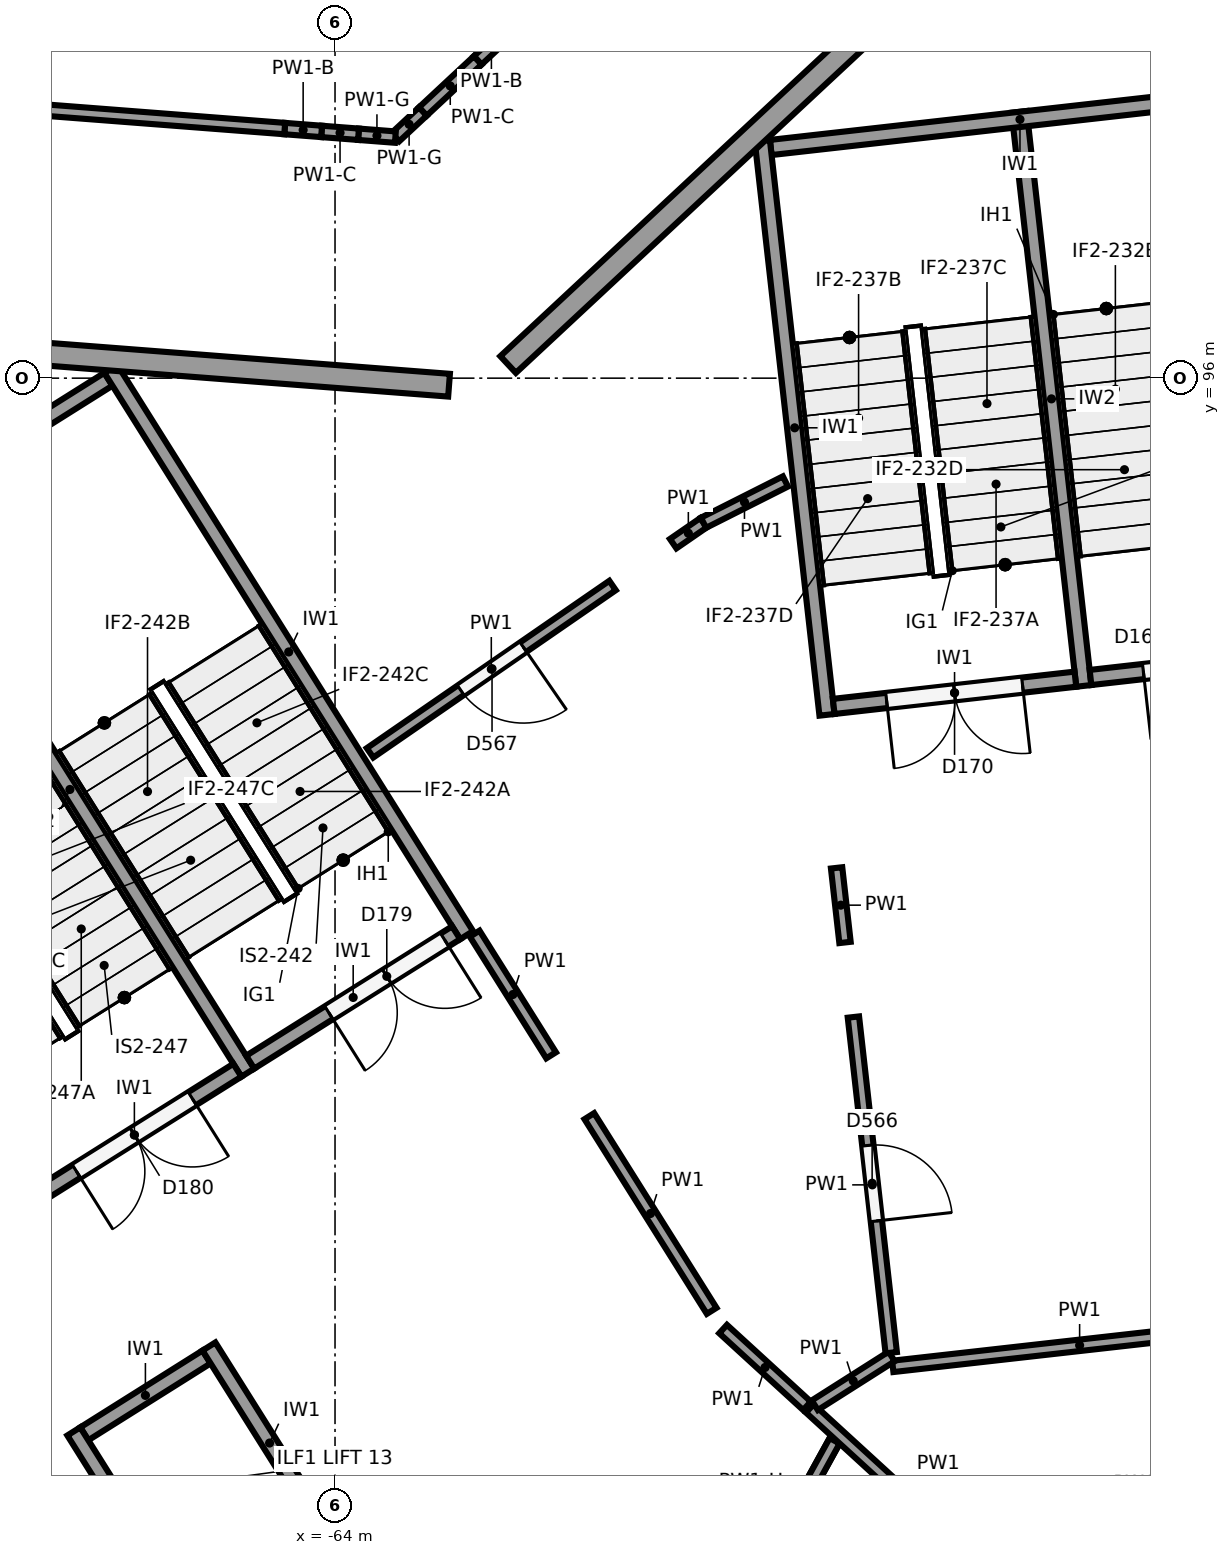
"""IFC4 building model, lengths in metres.
Left out: names, types, materials, properties, quantities, classifications, styles, units other than length and angle.
Written with IfcOpenShell. Run it as: python <this file> out.ifc"""

import sys

from ifc_helpers import new_model, si_unit, direction, frame, frame_2d, origin, origin_2d, place, context, subcontext, project, spatial, rectangle, circle, extrude, element, fill, save


model = new_model("IFC4")
c1 = context("Model", 3, precision=1e-05, world=origin(), true_north=direction((0.0, 1.0)))
c2 = subcontext(c1, "Body", "Model", "MODEL_VIEW")
j1 = project(units=[si_unit("LENGTHUNIT", "METRE"), si_unit("PLANEANGLEUNIT", "RADIAN")], contexts=[c1])
p1 = place(None, origin())
s1 = spatial("IfcSite", under=j1, at=p1, CompositionType="ELEMENT")
p2 = place(p1, origin())
s2 = spatial("IfcBuilding", under=s1, at=p2, CompositionType="ELEMENT")
p3 = place(p2, origin())
s3 = spatial("IfcBuildingStorey", under=s2, at=p3, CompositionType="ELEMENT", Elevation=0.0)
for number, where, z_axis, x_axis in (
    (1, (-55.8, 88.542, 0.0), (0.0, 0.0, 1.0), (1.0, 0.0, 0.0)),
    (2, (-62.052, 95.873, 0.0), (0.0, 0.0, 1.0), (1.0, 0.0, 0.0)),
):
    element("IfcColumn", number, at=place(p3, frame(where, z_axis=z_axis, x_axis=x_axis)), inside=s3, PredefinedType="COLUMN", context=c2, shape_type="SweptSolid", body=[
        extrude(circle(Radius=0.45, at=origin_2d()), origin(), (0.0, 0.0, 1.0), 6.5),
    ])
p4 = place(p3, frame((-63.731, 85.771, 0.0), z_axis=(0.0, 0.0, 1.0), x_axis=(1.0, 0.0, 0.0)))
e3 = element("IfcColumn", 3, at=p4, inside=s3, PredefinedType="COLUMN", context=c2, shape_type="SweptSolid", body=[
    extrude(circle(Radius=0.6, at=origin_2d()), origin(), (0.0, 0.0, 1.0), 6.5),
])
p5 = place(p3, frame((-63.373, 99.648, -0.3), z_axis=(0.0, 0.0, 1.0), x_axis=(1.0, 0.0, 0.0)))
e4 = element("IfcColumn", 4, at=p5, inside=s3, PredefinedType="COLUMN", context=c2, shape_type="SweptSolid", body=[
    extrude(circle(Radius=0.4, at=origin_2d()), origin(), (0.0, 0.0, 1.0), 6.8),
])
p6 = place(p3, frame((-61.723, 96.179, 0.0), z_axis=(0.0, 0.0, 1.0), x_axis=(0.731540985517, 0.681797467368, 0.0)))
e5 = element("IfcWall", 5, at=p6, inside=s3, PredefinedType="SOLIDWALL", context=c2, shape_type="SweptSolid", body=[
    extrude(rectangle(XDim=12.314, YDim=0.3, at=frame_2d((6.157, 0.0))), origin(), (0.0, 0.0, 1.0), 4.85),
])
p7 = place(p3, frame((-74.977, 96.87, 0.0), z_axis=(0.0, 0.0, 1.0), x_axis=(0.997035289114, -0.076945644854, 0.0)))
e6 = element("IfcWall", 6, at=p7, inside=s3, PredefinedType="SOLIDWALL", context=c2, shape_type="SweptSolid", body=[
    extrude(rectangle(XDim=12.514, YDim=0.3, at=frame_2d((6.257, 0.0))), origin(), (0.0, 0.0, 1.0), 4.85),
])
p8 = place(p3, frame((-58.378, 99.123, 0.0), z_axis=(0.0, 0.0, 1.0), x_axis=(0.111982724367, -0.993710153638, 0.0)))
e7 = element("IfcWall", 7, at=p8, inside=s3, PredefinedType="SHEAR", context=c2, shape_type="SweptSolid", body=[
    extrude(rectangle(XDim=7.6, YDim=0.2, at=frame_2d((3.8, 0.0))), origin(), (0.0, 0.0, 1.0), 6.15),
])
p9 = place(p3, frame((-51.709, 99.774, 0.0), z_axis=(0.0, 0.0, 1.0), x_axis=(-0.993715690617, -0.111933579504, 0.0)))
e8 = element("IfcWall", 8, at=p9, inside=s3, PredefinedType="SHEAR", context=c2, shape_type="SweptSolid", body=[
    extrude(rectangle(XDim=6.6, YDim=0.2, at=frame_2d((3.3, 0.0))), origin(), (0.0, 0.0, 1.0), 6.15),
])
p10 = place(p3, frame((-54.999, 99.504, 0.0), z_axis=(0.0, 0.0, 1.0), x_axis=(0.111982724367, -0.993710153638, 0.0)))
e9 = element("IfcWall", 9, at=p10, inside=s3, PredefinedType="SHEAR", context=c2, shape_type="SweptSolid", body=[
    extrude(rectangle(XDim=7.6, YDim=0.2, at=frame_2d((3.8, 0.0))), origin(), (0.0, 0.0, 1.0), 6.15),
])
p11 = place(p3, frame((-50.88, 92.42, 0.0), z_axis=(0.0, 0.0, 1.0), x_axis=(-0.993707560215, -0.112005735442, 0.0)))
e10 = element("IfcWall", 10, at=p11, inside=s3, PredefinedType="SHEAR", context=c2, shape_type="SweptSolid", body=[
    extrude(rectangle(XDim=3.2, YDim=0.2, at=frame_2d((1.6, 0.0))), origin(), (0.0, 0.0, 1.0), 6.15),
])
p12 = place(p11, frame((0.7, 0.0, 0.0)))
e11 = element("IfcOpeningElement", 11, at=p12, cuts=e10, PredefinedType="OPENING", context=c2, shape_type="SweptSolid", body=[
    extrude(rectangle(XDim=1.8, YDim=2.1, at=frame_2d((0.9, 1.05))), frame((0.0, 0.11, 0.0), z_axis=(0.0, -1.0, 0.0), x_axis=(1.0, 0.0, 0.0)), (0.0, 0.0, 1.0), 0.22),
])
p13 = place(p3, frame((-54.259, 92.04, 0.0), z_axis=(0.0, 0.0, 1.0), x_axis=(-0.993717005286, -0.11192190762, 0.0)))
e12 = element("IfcWall", 12, at=p13, inside=s3, PredefinedType="SHEAR", context=c2, shape_type="SweptSolid", body=[
    extrude(rectangle(XDim=3.2, YDim=0.2, at=frame_2d((1.6, 0.0))), origin(), (0.0, 0.0, 1.0), 6.15),
])
p14 = place(p13, frame((0.7, 0.0, 0.0)))
e13 = element("IfcOpeningElement", 13, at=p14, cuts=e12, PredefinedType="OPENING", context=c2, shape_type="SweptSolid", body=[
    extrude(rectangle(XDim=1.8, YDim=2.1, at=frame_2d((0.9, 1.05))), frame((0.0, 0.11, 0.0), z_axis=(0.0, -1.0, 0.0), x_axis=(1.0, 0.0, 0.0)), (0.0, 0.0, 1.0), 0.22),
])
p15 = place(p3, frame((-66.95, 96.123, 0.0), z_axis=(0.0, 0.0, 1.0), x_axis=(0.532032334759, -0.846724036963, 0.0)))
e14 = element("IfcWall", 14, at=p15, inside=s3, PredefinedType="SHEAR", context=c2, shape_type="SweptSolid", body=[
    extrude(rectangle(XDim=8.8, YDim=0.2, at=frame_2d((4.4, 0.0))), origin(), (0.0, 0.0, 1.0), 6.15),
])
p16 = place(p3, frame((-66.982, 95.986, 0.0), z_axis=(0.0, 0.0, 1.0), x_axis=(-0.846719870989, -0.532038964807, 0.0)))
e15 = element("IfcWall", 15, at=p16, inside=s3, PredefinedType="SHEAR", context=c2, shape_type="SweptSolid", body=[
    extrude(rectangle(XDim=6.6, YDim=0.2, at=frame_2d((3.3, 0.0))), origin(), (0.0, 0.0, 1.0), 6.15),
])
p17 = place(p3, frame((-69.829, 94.314, 0.0), z_axis=(0.0, 0.0, 1.0), x_axis=(0.532032334759, -0.846724036963, 0.0)))
e16 = element("IfcWall", 16, at=p17, inside=s3, PredefinedType="SHEAR", context=c2, shape_type="SweptSolid", body=[
    extrude(rectangle(XDim=8.8, YDim=0.2, at=frame_2d((4.4, 0.0))), origin(), (0.0, 0.0, 1.0), 6.15),
])
p18 = place(p3, frame((-62.406, 88.704, 0.0), z_axis=(0.0, 0.0, 1.0), x_axis=(-0.846735733015, -0.532013720158, 0.0)))
e17 = element("IfcWall", 17, at=p18, inside=s3, PredefinedType="SHEAR", context=c2, shape_type="SweptSolid", body=[
    extrude(rectangle(XDim=3.2, YDim=0.2, at=frame_2d((1.6, 0.0))), origin(), (0.0, 0.0, 1.0), 6.15),
])
p19 = place(p18, frame((0.178, 0.0, 0.0)))
e18 = element("IfcOpeningElement", 18, at=p19, cuts=e17, PredefinedType="OPENING", context=c2, shape_type="SweptSolid", body=[
    extrude(rectangle(XDim=1.8, YDim=2.1, at=frame_2d((0.9, 1.05))), frame((0.0, 0.11, 0.0), z_axis=(0.0, -1.0, 0.0), x_axis=(1.0, 0.0, 0.0)), (0.0, 0.0, 1.0), 0.22),
])
p20 = place(p3, frame((-65.285, 86.895, 0.0), z_axis=(0.0, 0.0, 1.0), x_axis=(-0.846735733015, -0.532013720158, 0.0)))
e19 = element("IfcWall", 19, at=p20, inside=s3, PredefinedType="SHEAR", context=c2, shape_type="SweptSolid", body=[
    extrude(rectangle(XDim=3.2, YDim=0.2, at=frame_2d((1.6, 0.0))), origin(), (0.0, 0.0, 1.0), 6.15),
])
p21 = place(p20, frame((0.7, 0.0, 0.0)))
e20 = element("IfcOpeningElement", 20, at=p21, cuts=e19, PredefinedType="OPENING", context=c2, shape_type="SweptSolid", body=[
    extrude(rectangle(XDim=1.8, YDim=2.1, at=frame_2d((0.9, 1.05))), frame((0.0, 0.11, 0.0), z_axis=(0.0, -1.0, 0.0), x_axis=(1.0, 0.0, 0.0)), (0.0, 0.0, 1.0), 0.22),
])
p22 = place(p3, frame((-65.659, 83.26, 0.0), z_axis=(0.0, 0.0, 1.0), x_axis=(0.532074873955, -0.846697306306, 0.0)))
e21 = element("IfcWall", 21, at=p22, inside=s3, PredefinedType="SHEAR", context=c2, shape_type="SweptSolid", body=[
    extrude(rectangle(XDim=3.0, YDim=0.2, at=frame_2d((1.5, 0.0))), origin(), (0.0, 0.0, 1.0), 6.15),
])
p23 = place(p3, frame((-67.437, 82.143, 0.0), z_axis=(0.0, 0.0, 1.0), x_axis=(0.532038212918, -0.84672034344, 0.0)))
e22 = element("IfcWall", 22, at=p23, inside=s3, PredefinedType="SHEAR", context=c2, shape_type="SweptSolid", body=[
    extrude(rectangle(XDim=3.0, YDim=0.2, at=frame_2d((1.5, 0.0))), origin(), (0.0, 0.0, 1.0), 6.15),
])
p24 = place(p3, frame((-65.69, 83.123, 0.0), z_axis=(0.0, 0.0, 1.0), x_axis=(-0.846674592738, -0.532111016623, 0.0)))
e23 = element("IfcWall", 23, at=p24, inside=s3, PredefinedType="SHEAR", context=c2, shape_type="SweptSolid", body=[
    extrude(rectangle(XDim=1.9, YDim=0.2, at=frame_2d((0.95, 0.0))), origin(), (0.0, 0.0, 1.0), 6.15),
])
p25 = place(p3, frame((-56.662, 82.999, 0.0), z_axis=(0.0, 0.0, 1.0), x_axis=(0.993712870511, 0.111958612801, 0.0)))
e24 = element("IfcWall", 24, at=p25, inside=s3, PredefinedType="PARTITIONING", context=c2, shape_type="SweptSolid", body=[
    extrude(rectangle(XDim=4.948, YDim=0.15, at=frame_2d((2.474, 0.0))), origin(), (0.0, 0.0, 1.0), 6.15),
])
p26 = place(p3, frame((-55.222, 80.129, 0.0), z_axis=(0.0, 0.0, 1.0), x_axis=(-0.737582217309, 0.675257338138, 0.0)))
e25 = element("IfcWall", 25, at=p26, inside=s3, PredefinedType="PARTITIONING", context=c2, shape_type="SweptSolid", body=[
    extrude(rectangle(XDim=3.431, YDim=0.15, at=frame_2d((1.716, 0.0))), origin(), (0.0, 0.0, 1.0), 6.15),
])
p27 = place(p3, frame((-57.688, 82.487, 0.0), z_axis=(0.0, 0.0, 1.0), x_axis=(0.844198175742, 0.536031193192, 0.0)))
e26 = element("IfcWall", 26, at=p27, inside=s3, PredefinedType="PARTITIONING", context=c2, shape_type="SweptSolid", body=[
    extrude(rectangle(XDim=1.198, YDim=0.15, at=frame_2d((0.599, 0.0))), origin(), (0.0, 0.0, 1.0), 6.15),
])
p28 = place(p3, frame((-60.348, 93.272, 0.0), z_axis=(0.0, 0.0, 1.0), x_axis=(-0.823118384127, -0.567869814053, 0.0)))
e27 = element("IfcWall", 27, at=p28, inside=s3, PredefinedType="PARTITIONING", context=c2, shape_type="SweptSolid", body=[
    extrude(rectangle(XDim=3.877, YDim=0.15, at=frame_2d((1.938, 0.0))), origin(), (0.0, 0.0, 1.0), 6.15),
])
p29 = place(p28, frame((1.427, 0.0, 0.0)))
e28 = element("IfcOpeningElement", 28, at=p29, cuts=e27, PredefinedType="OPENING", context=c2, shape_type="SweptSolid", body=[
    extrude(rectangle(XDim=1.0, YDim=2.1, at=frame_2d((0.5, 1.05))), frame((0.0, 0.085, 0.0), z_axis=(0.0, -1.0, 0.0), x_axis=(1.0, 0.0, 0.0)), (0.0, 0.0, 1.0), 0.17),
])
p30 = place(p3, frame((-59.551, 93.823, 0.0), z_axis=(0.0, 0.0, 1.0), x_axis=(0.823188427996, 0.567768273165, 0.0)))
e29 = element("IfcWall", 29, at=p30, inside=s3, PredefinedType="PARTITIONING", context=c2, shape_type="SweptSolid", body=[
    extrude(rectangle(XDim=0.485, YDim=0.15, at=frame_2d((0.242, 0.0))), origin(), (0.0, 0.0, 1.0), 6.15),
])
p31 = place(p3, frame((-59.152, 94.098, 0.0), z_axis=(0.0, 0.0, 1.0), x_axis=(0.89288454256, 0.450285680049, 0.0)))
e30 = element("IfcWall", 30, at=p31, inside=s3, PredefinedType="PARTITIONING", context=c2, shape_type="SweptSolid", body=[
    extrude(rectangle(XDim=1.207, YDim=0.15, at=frame_2d((0.604, 0.0))), origin(), (0.0, 0.0, 1.0), 6.15),
])
p32 = place(p3, frame((-57.79, 82.479, 0.0), z_axis=(0.0, 0.0, 1.0), x_axis=(-0.737580634044, 0.675259067531, 0.0)))
e31 = element("IfcWall", 31, at=p32, inside=s3, PredefinedType="PARTITIONING", context=c2, shape_type="SweptSolid", body=[
    extrude(rectangle(XDim=1.496, YDim=0.15, at=frame_2d((0.748, 0.0))), origin(), (0.0, 0.0, 1.0), 6.15),
])
p33 = place(p3, frame((-59.044, 83.729, 0.0), z_axis=(0.0, 0.0, 1.0), x_axis=(-0.532093859438, 0.846685375301, 0.0)))
e32 = element("IfcWall", 32, at=p33, inside=s3, PredefinedType="PARTITIONING", context=c2, shape_type="SweptSolid", body=[
    extrude(rectangle(XDim=3.025, YDim=0.15, at=frame_2d((1.513, 0.0))), origin(), (0.0, 0.0, 1.0), 6.15),
])
p34 = place(p3, frame((-61.157, 87.091, 0.0), z_axis=(0.0, 0.0, 1.0), x_axis=(-0.532052497691, 0.84671136741, 0.0)))
e33 = element("IfcWall", 33, at=p34, inside=s3, PredefinedType="PARTITIONING", context=c2, shape_type="SweptSolid", body=[
    extrude(rectangle(XDim=1.89, YDim=0.15, at=frame_2d((0.945, 0.0))), origin(), (0.0, 0.0, 1.0), 6.15),
])
p35 = place(p3, frame((-57.401, 89.557, 0.0), z_axis=(0.0, 0.0, 1.0), x_axis=(0.111977847894, -0.993710703163, 0.0)))
e34 = element("IfcWall", 34, at=p35, inside=s3, PredefinedType="PARTITIONING", context=c2, shape_type="SweptSolid", body=[
    extrude(rectangle(XDim=0.988, YDim=0.15, at=frame_2d((0.494, 0.0))), origin(), (0.0, 0.0, 1.0), 6.15),
])
p36 = place(p3, frame((-57.18, 87.595, 0.0), z_axis=(0.0, 0.0, 1.0), x_axis=(0.112023313707, -0.993705578723, 0.0)))
e35 = element("IfcWall", 35, at=p36, inside=s3, PredefinedType="PARTITIONING", context=c2, shape_type="SweptSolid", body=[
    extrude(rectangle(XDim=4.444, YDim=0.15, at=frame_2d((2.222, 0.0))), origin(), (0.0, 0.0, 1.0), 6.15),
])
p37 = place(p36, frame((1.7, 0.0, 0.0)))
e36 = element("IfcOpeningElement", 36, at=p37, cuts=e35, PredefinedType="OPENING", context=c2, shape_type="SweptSolid", body=[
    extrude(rectangle(XDim=1.0, YDim=2.1, at=frame_2d((0.5, 1.05))), frame((0.0, 0.085, 0.0), z_axis=(0.0, -1.0, 0.0), x_axis=(1.0, 0.0, 0.0)), (0.0, 0.0, 1.0), 0.17),
])
p38 = place(p3, frame((-61.762, 100.517, 0.0), z_axis=(0.0, 0.0, 1.0), x_axis=(-0.731417207669, -0.681930251805, 0.0)))
e37 = element("IfcWall", 37, at=p38, inside=s3, PredefinedType="PARTITIONING", context=c2, shape_type="SweptSolid", body=[
    extrude(rectangle(XDim=0.493, YDim=0.15, at=frame_2d((0.247, 0.0))), origin(), (0.0, 0.0, 1.0), 4.85),
])
p39 = place(p3, frame((-62.123, 100.18, 0.0), z_axis=(0.0, 0.0, 1.0), x_axis=(-0.731655638736, -0.681674428379, 0.0)))
e38 = element("IfcWall", 38, at=p39, inside=s3, PredefinedType="PARTITIONING", context=c2, shape_type="SweptSolid", body=[
    extrude(rectangle(XDim=0.987, YDim=0.15, at=frame_2d((0.493, 0.0))), origin(), (0.0, 0.0, 1.0), 6.05),
])
p40 = place(p3, frame((-62.845, 99.508, 0.0), z_axis=(0.0, 0.0, 1.0), x_axis=(-0.731417207669, -0.681930251805, 0.0)))
e39 = element("IfcWall", 39, at=p40, inside=s3, PredefinedType="PARTITIONING", context=c2, shape_type="SweptSolid", body=[
    extrude(rectangle(XDim=0.493, YDim=0.15, at=frame_2d((0.247, 0.0))), origin(), (0.0, 0.0, 1.0), 5.4),
])
p41 = place(p3, frame((-63.206, 99.171, 0.0), z_axis=(0.0, 0.0, 1.0), x_axis=(-0.997051534558, 0.076734851503, 0.0)))
e40 = element("IfcWall", 40, at=p41, inside=s3, PredefinedType="PARTITIONING", context=c2, shape_type="SweptSolid", body=[
    extrude(rectangle(XDim=0.487, YDim=0.15, at=frame_2d((0.243, 0.0))), origin(), (0.0, 0.0, 1.0), 5.4),
])
p42 = place(p3, frame((-63.691, 99.209, 0.0), z_axis=(0.0, 0.0, 1.0), x_axis=(-0.997054485502, 0.076696498885, 0.0)))
e41 = element("IfcWall", 41, at=p42, inside=s3, PredefinedType="PARTITIONING", context=c2, shape_type="SweptSolid", body=[
    extrude(rectangle(XDim=0.487, YDim=0.15, at=frame_2d((0.244, 0.0))), origin(), (0.0, 0.0, 1.0), 6.05),
])
p43 = place(p3, frame((-64.177, 99.246, 0.0), z_axis=(0.0, 0.0, 1.0), x_axis=(-0.99701303965, 0.07723340448, 0.0)))
e42 = element("IfcWall", 42, at=p43, inside=s3, PredefinedType="PARTITIONING", context=c2, shape_type="SweptSolid", body=[
    extrude(rectangle(XDim=0.487, YDim=0.15, at=frame_2d((0.243, 0.0))), origin(), (0.0, 0.0, 1.0), 4.85),
])
p44 = place(p3, frame((-64.662, 99.284, 0.0), z_axis=(0.0, 0.0, 1.0), x_axis=(-0.997035430136, 0.076943817519, 0.0)))
e43 = element("IfcWall", 43, at=p44, inside=s3, PredefinedType="PARTITIONING", context=c2, shape_type="SweptSolid", body=[
    extrude(rectangle(XDim=9.738, YDim=0.15, at=frame_2d((4.869, 0.0))), origin(), (0.0, 0.0, 1.0), 4.85),
])
p45 = place(p3, frame((-57.427, 82.02, 0.0), z_axis=(0.0, 0.0, 1.0), x_axis=(-0.482565075982, -0.87586011865, 0.0)))
e44 = element("IfcWall", 44, at=p45, inside=s3, PredefinedType="PARTITIONING", context=c2, shape_type="SweptSolid", body=[
    extrude(rectangle(XDim=4.335, YDim=0.15, at=frame_2d((2.167, 0.0))), origin(), (0.0, 0.0, 1.0), 5.05),
])
p46 = place(p45, frame((1.25, 0.0, 0.0)))
e45 = element("IfcOpeningElement", 45, at=p46, cuts=e44, PredefinedType="OPENING", context=c2, shape_type="SweptSolid", body=[
    extrude(rectangle(XDim=1.8, YDim=2.1, at=frame_2d((0.9, 1.05))), frame((0.0, 0.085, 0.0), z_axis=(0.0, -1.0, 0.0), x_axis=(1.0, 0.0, 0.0)), (0.0, 0.0, 1.0), 0.17),
])
p47 = place(p3, frame((-57.427, 82.02, 5.05), z_axis=(0.0, 0.0, 1.0), x_axis=(-0.482524456718, -0.875882497067, 0.0)))
e46 = element("IfcWall", 46, at=p47, inside=s3, PredefinedType="PARTITIONING", context=c2, shape_type="SweptSolid", body=[
    extrude(rectangle(XDim=1.238, YDim=0.15, at=frame_2d((0.619, 0.0))), origin(), (0.0, 0.0, 1.0), 1.1),
])
p48 = place(p12, origin())
e47 = element("IfcDoor", 47, at=p48, inside=s3, OperationType="DOUBLE_DOOR_SINGLE_SWING", PredefinedType="DOOR", context=c2, shape_type="SweptSolid", body=[
    extrude(rectangle(XDim=1.8, YDim=2.1, at=frame_2d((0.9, 1.05))), frame((0.0, 0.025, 0.0), z_axis=(0.0, -1.0, 0.0), x_axis=(1.0, 0.0, 0.0)), (0.0, 0.0, 1.0), 0.05),
])
fill(e11, e47)
p49 = place(p14, origin())
e48 = element("IfcDoor", 48, at=p49, inside=s3, OperationType="DOUBLE_DOOR_SINGLE_SWING", PredefinedType="DOOR", context=c2, shape_type="SweptSolid", body=[
    extrude(rectangle(XDim=1.8, YDim=2.1, at=frame_2d((0.9, 1.05))), frame((0.0, 0.025, 0.0), z_axis=(0.0, -1.0, 0.0), x_axis=(1.0, 0.0, 0.0)), (0.0, 0.0, 1.0), 0.05),
])
fill(e13, e48)
p50 = place(p19, origin())
e49 = element("IfcDoor", 49, at=p50, inside=s3, OperationType="DOUBLE_DOOR_SINGLE_SWING", PredefinedType="DOOR", context=c2, shape_type="SweptSolid", body=[
    extrude(rectangle(XDim=1.8, YDim=2.1, at=frame_2d((0.9, 1.05))), frame((0.0, 0.025, 0.0), z_axis=(0.0, -1.0, 0.0), x_axis=(1.0, 0.0, 0.0)), (0.0, 0.0, 1.0), 0.05),
])
fill(e18, e49)
p51 = place(p21, origin())
e50 = element("IfcDoor", 50, at=p51, inside=s3, OperationType="DOUBLE_DOOR_SINGLE_SWING", PredefinedType="DOOR", context=c2, shape_type="SweptSolid", body=[
    extrude(rectangle(XDim=1.8, YDim=2.1, at=frame_2d((0.9, 1.05))), frame((0.0, 0.025, 0.0), z_axis=(0.0, -1.0, 0.0), x_axis=(1.0, 0.0, 0.0)), (0.0, 0.0, 1.0), 0.05),
])
fill(e20, e50)
p52 = place(p29, origin())
e51 = element("IfcDoor", 51, at=p52, inside=s3, OperationType="SINGLE_SWING_LEFT", PredefinedType="DOOR", context=c2, shape_type="SweptSolid", body=[
    extrude(rectangle(XDim=1.0, YDim=2.1, at=frame_2d((0.5, 1.05))), frame((0.0, 0.025, 0.0), z_axis=(0.0, -1.0, 0.0), x_axis=(1.0, 0.0, 0.0)), (0.0, 0.0, 1.0), 0.05),
])
fill(e28, e51)
p53 = place(p37, origin())
e52 = element("IfcDoor", 52, at=p53, inside=s3, OperationType="SINGLE_SWING_RIGHT", PredefinedType="DOOR", context=c2, shape_type="SweptSolid", body=[
    extrude(rectangle(XDim=1.0, YDim=2.1, at=frame_2d((0.5, 1.05))), frame((0.0, 0.025, 0.0), z_axis=(0.0, -1.0, 0.0), x_axis=(1.0, 0.0, 0.0)), (0.0, 0.0, 1.0), 0.05),
])
fill(e36, e52)
save(model, sys.argv[1])
